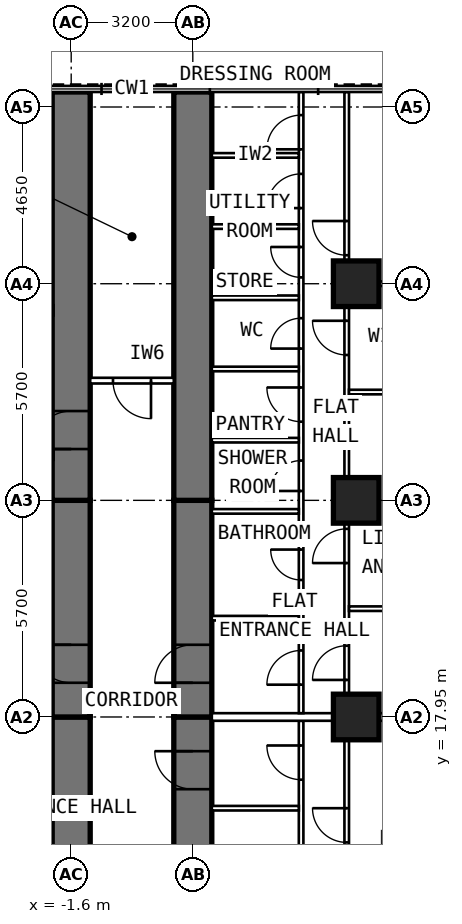
"""IFC4 building model, lengths in metres.
Left out: names, types, materials, properties, quantities, classifications, styles, units other than length and angle.
Written with IfcOpenShell. Run it as: python <this file> out.ifc"""

import sys

from ifc_helpers import new_model, si_unit, direction, frame, frame_2d, origin, origin_2d, place, context, subcontext, project, spatial, rectangle, extrude, element, fill, save


model = new_model("IFC4")
c1 = context("Model", 3, precision=1e-05, world=origin(), true_north=direction((0.0, 1.0)))
c2 = subcontext(c1, "Body", "Model", "MODEL_VIEW")
j1 = project(units=[si_unit("LENGTHUNIT", "METRE"), si_unit("PLANEANGLEUNIT", "RADIAN")], contexts=[c1])
p1 = place(None, origin())
s1 = spatial("IfcSite", under=j1, at=p1, CompositionType="ELEMENT")
p2 = place(p1, origin())
s2 = spatial("IfcBuilding", under=s1, at=p2, CompositionType="ELEMENT")
p3 = place(p2, frame((0.0, 0.0, 109.6)))
s3 = spatial("IfcBuildingStorey", under=s2, at=p3, CompositionType="ELEMENT", Elevation=109.6)
for number, where, z_axis, x_axis in (
    (1, (5.9, 17.95, 0.0), (0.0, 0.0, 1.0), (0.0, 1.0, 0.0)),
    (2, (5.9, 23.65, 0.0), (0.0, 0.0, 1.0), (0.0, 1.0, 0.0)),
    (3, (5.9, 29.35, 0.0), (0.0, 0.0, 1.0), (0.0, 1.0, 0.0)),
):
    element("IfcColumn", number, at=place(p3, frame(where, z_axis=z_axis, x_axis=x_axis)), inside=s3, PredefinedType="COLUMN", context=c2, shape_type="SweptSolid", body=[
        extrude(rectangle(XDim=1.2, YDim=1.2, at=origin_2d()), origin(), (0.0, 0.0, 1.0), 3.6),
    ])
p4 = place(p3, frame((-1.6, 9.6, 0.0), z_axis=(0.0, 0.0, 1.0), x_axis=(0.0, 1.0, 0.0)))
e4 = element("IfcWall", 4, at=p4, inside=s3, PredefinedType="SHEAR", context=c2, shape_type="SweptSolid", body=[
    extrude(rectangle(XDim=8.35, YDim=1.0, at=frame_2d((4.175, 0.0))), origin(), (0.0, 0.0, 1.0), 3.6),
])
p5 = place(p4, frame((3.88, 0.0, 0.0)))
e5 = element("IfcOpeningElement", 5, at=p5, cuts=e4, PredefinedType="OPENING", context=c2, shape_type="SweptSolid", body=[
    extrude(rectangle(XDim=1.0, YDim=2.1, at=frame_2d((0.5, 1.05))), frame((0.0, 0.512, 0.0), z_axis=(0.0, -1.0, 0.0), x_axis=(1.0, 0.0, 0.0)), (0.0, 0.0, 1.0), 1.024),
])
p6 = place(p3, frame((-1.6, 17.95, 0.0), z_axis=(0.0, 0.0, 1.0), x_axis=(0.0, 1.0, 0.0)))
e6 = element("IfcWall", 6, at=p6, inside=s3, PredefinedType="SHEAR", context=c2, shape_type="SweptSolid", body=[
    extrude(rectangle(XDim=5.7, YDim=1.0, at=frame_2d((2.85, 0.0))), origin(), (0.0, 0.0, 1.0), 3.6),
])
p7 = place(p6, frame((0.9, 0.0, 0.0)))
e7 = element("IfcOpeningElement", 7, at=p7, cuts=e6, PredefinedType="OPENING", context=c2, shape_type="SweptSolid", body=[
    extrude(rectangle(XDim=1.0, YDim=2.1, at=frame_2d((0.5, 1.05))), frame((0.0, 0.512, 0.0), z_axis=(0.0, -1.0, 0.0), x_axis=(1.0, 0.0, 0.0)), (0.0, 0.0, 1.0), 1.024),
])
p8 = place(p3, frame((-1.6, 23.65, 0.0), z_axis=(0.0, 0.0, 1.0), x_axis=(0.0, 1.0, 0.0)))
e8 = element("IfcWall", 8, at=p8, inside=s3, PredefinedType="SHEAR", context=c2, shape_type="SweptSolid", body=[
    extrude(rectangle(XDim=10.745, YDim=1.0, at=frame_2d((5.373, 0.0))), origin(), (0.0, 0.0, 1.0), 3.6),
])
p9 = place(p8, frame((1.35, 0.0, 0.0)))
e9 = element("IfcOpeningElement", 9, at=p9, cuts=e8, PredefinedType="OPENING", context=c2, shape_type="SweptSolid", body=[
    extrude(rectangle(XDim=1.0, YDim=2.1, at=frame_2d((0.5, 1.05))), frame((0.0, 0.512, 0.0), z_axis=(0.0, -1.0, 0.0), x_axis=(1.0, 0.0, 0.0)), (0.0, 0.0, 1.0), 1.024),
])
p10 = place(p3, frame((1.6, 9.6, 0.0), z_axis=(0.0, 0.0, 1.0), x_axis=(0.0, 1.0, 0.0)))
e10 = element("IfcWall", 10, at=p10, inside=s3, PredefinedType="SHEAR", context=c2, shape_type="SweptSolid", body=[
    extrude(rectangle(XDim=8.35, YDim=1.0, at=frame_2d((4.175, 0.0))), origin(), (0.0, 0.0, 1.0), 3.6),
])
p11 = place(p10, frame((6.45, 0.0, 0.0)))
e11 = element("IfcOpeningElement", 11, at=p11, cuts=e10, PredefinedType="OPENING", context=c2, shape_type="SweptSolid", body=[
    extrude(rectangle(XDim=1.0, YDim=2.1, at=frame_2d((0.5, 1.05))), frame((0.0, 0.512, 0.0), z_axis=(0.0, -1.0, 0.0), x_axis=(1.0, 0.0, 0.0)), (0.0, 0.0, 1.0), 1.024),
])
p12 = place(p3, frame((1.6, 17.95, 0.0), z_axis=(0.0, 0.0, 1.0), x_axis=(0.0, 1.0, 0.0)))
e12 = element("IfcWall", 12, at=p12, inside=s3, PredefinedType="SHEAR", context=c2, shape_type="SweptSolid", body=[
    extrude(rectangle(XDim=5.7, YDim=1.0, at=frame_2d((2.85, 0.0))), origin(), (0.0, 0.0, 1.0), 3.6),
])
p13 = place(p12, frame((0.9, 0.0, 0.0)))
e13 = element("IfcOpeningElement", 13, at=p13, cuts=e12, PredefinedType="OPENING", context=c2, shape_type="SweptSolid", body=[
    extrude(rectangle(XDim=1.0, YDim=2.1, at=frame_2d((0.5, 1.05))), frame((0.0, 0.512, 0.0), z_axis=(0.0, -1.0, 0.0), x_axis=(1.0, 0.0, 0.0)), (0.0, 0.0, 1.0), 1.024),
])
p14 = place(p3, frame((1.6, 23.65, 0.0), z_axis=(0.0, 0.0, 1.0), x_axis=(0.0, 1.0, 0.0)))
e14 = element("IfcWall", 14, at=p14, inside=s3, PredefinedType="SHEAR", context=c2, shape_type="SweptSolid", body=[
    extrude(rectangle(XDim=10.745, YDim=1.0, at=frame_2d((5.373, 0.0))), origin(), (0.0, 0.0, 1.0), 3.6),
])
p15 = place(p3, frame((-2.1, 17.95, 0.0), z_axis=(0.0, 0.0, 1.0), x_axis=(-1.0, 0.0, 0.0)))
e15 = element("IfcWall", 15, at=p15, inside=s3, PredefinedType="PARTITIONING", context=c2, shape_type="SweptSolid", body=[
    extrude(rectangle(XDim=8.6, YDim=0.2, at=frame_2d((4.3, 0.0))), origin(), (0.0, 0.0, 1.0), 3.3),
])
p16 = place(p3, frame((4.45, 10.1, 0.0), z_axis=(0.0, 0.0, 1.0), x_axis=(0.0, 1.0, 0.0)))
e16 = element("IfcWall", 16, at=p16, inside=s3, PredefinedType="PARTITIONING", context=c2, shape_type="SweptSolid", body=[
    extrude(rectangle(XDim=7.75, YDim=0.12, at=frame_2d((3.875, 0.0))), origin(), (0.0, 0.0, 1.0), 3.3),
])
p17 = place(p16, frame((0.56, 0.0, 0.0)))
e17 = element("IfcOpeningElement", 17, at=p17, cuts=e16, PredefinedType="OPENING", context=c2, shape_type="SweptSolid", body=[
    extrude(rectangle(XDim=0.9, YDim=2.1, at=frame_2d((0.45, 1.05))), frame((0.0, 0.072, 0.0), z_axis=(0.0, -1.0, 0.0), x_axis=(1.0, 0.0, 0.0)), (0.0, 0.0, 1.0), 0.144),
])
p18 = place(p16, frame((3.385, 0.0, 0.0)))
e18 = element("IfcOpeningElement", 18, at=p18, cuts=e16, PredefinedType="OPENING", context=c2, shape_type="SweptSolid", body=[
    extrude(rectangle(XDim=0.8, YDim=2.1, at=frame_2d((0.4, 1.05))), frame((0.0, 0.072, 0.0), z_axis=(0.0, -1.0, 0.0), x_axis=(1.0, 0.0, 0.0)), (0.0, 0.0, 1.0), 0.144),
])
p19 = place(p16, frame((6.2, 0.0, 0.0)))
e19 = element("IfcOpeningElement", 19, at=p19, cuts=e16, PredefinedType="OPENING", context=c2, shape_type="SweptSolid", body=[
    extrude(rectangle(XDim=0.9, YDim=2.1, at=frame_2d((0.45, 1.05))), frame((0.0, 0.072, 0.0), z_axis=(0.0, -1.0, 0.0), x_axis=(1.0, 0.0, 0.0)), (0.0, 0.0, 1.0), 0.144),
])
p20 = place(p3, frame((5.65, 9.6, 0.0), z_axis=(0.0, 0.0, 1.0), x_axis=(0.0, 1.0, 0.0)))
e20 = element("IfcWall", 20, at=p20, inside=s3, PredefinedType="PARTITIONING", context=c2, shape_type="SweptSolid", body=[
    extrude(rectangle(XDim=8.1, YDim=0.12, at=frame_2d((4.05, 0.0))), origin(), (0.0, 0.0, 1.0), 3.3),
])
p21 = place(p20, frame((5.05, 0.0, 0.0)))
e21 = element("IfcOpeningElement", 21, at=p21, cuts=e20, PredefinedType="OPENING", context=c2, shape_type="SweptSolid", body=[
    extrude(rectangle(XDim=0.9, YDim=2.1, at=frame_2d((0.45, 1.05))), frame((0.0, 0.072, 0.0), z_axis=(0.0, -1.0, 0.0), x_axis=(1.0, 0.0, 0.0)), (0.0, 0.0, 1.0), 0.144),
])
p22 = place(p3, frame((2.1, 15.55, 0.0), z_axis=(0.0, 0.0, 1.0), x_axis=(1.0, 0.0, 0.0)))
e22 = element("IfcWall", 22, at=p22, inside=s3, PredefinedType="PARTITIONING", context=c2, shape_type="SweptSolid", body=[
    extrude(rectangle(XDim=2.29, YDim=0.12, at=frame_2d((1.145, 0.0))), origin(), (0.0, 0.0, 1.0), 3.3),
])
p23 = place(p3, frame((4.45, 18.05, 0.0), z_axis=(0.0, 0.0, 1.0), x_axis=(0.0, 1.0, 0.0)))
e23 = element("IfcWall", 23, at=p23, inside=s3, PredefinedType="PARTITIONING", context=c2, shape_type="SweptSolid", body=[
    extrude(rectangle(XDim=16.345, YDim=0.12, at=frame_2d((8.172, 0.0))), origin(), (0.0, 0.0, 1.0), 3.3),
])
p24 = place(p23, frame((0.75, 0.0, 0.0)))
e24 = element("IfcOpeningElement", 24, at=p24, cuts=e23, PredefinedType="OPENING", context=c2, shape_type="SweptSolid", body=[
    extrude(rectangle(XDim=0.9, YDim=2.1, at=frame_2d((0.45, 1.05))), frame((0.0, 0.072, 0.0), z_axis=(0.0, -1.0, 0.0), x_axis=(1.0, 0.0, 0.0)), (0.0, 0.0, 1.0), 0.144),
])
p25 = place(p23, frame((3.505, 0.0, 0.0)))
e25 = element("IfcOpeningElement", 25, at=p25, cuts=e23, PredefinedType="OPENING", context=c2, shape_type="SweptSolid", body=[
    extrude(rectangle(XDim=0.8, YDim=2.1, at=frame_2d((0.4, 1.05))), frame((0.0, 0.072, 0.0), z_axis=(0.0, -1.0, 0.0), x_axis=(1.0, 0.0, 0.0)), (0.0, 0.0, 1.0), 0.144),
])
p26 = place(p23, frame((5.847, 0.0, 0.0)))
e26 = element("IfcOpeningElement", 26, at=p26, cuts=e23, PredefinedType="OPENING", context=c2, shape_type="SweptSolid", body=[
    extrude(rectangle(XDim=0.8, YDim=2.1, at=frame_2d((0.4, 1.05))), frame((0.0, 0.072, 0.0), z_axis=(0.0, -1.0, 0.0), x_axis=(1.0, 0.0, 0.0)), (0.0, 0.0, 1.0), 0.144),
])
p27 = place(p23, frame((7.67, 0.0, 0.0)))
e27 = element("IfcOpeningElement", 27, at=p27, cuts=e23, PredefinedType="OPENING", context=c2, shape_type="SweptSolid", body=[
    extrude(rectangle(XDim=0.9, YDim=2.1, at=frame_2d((0.45, 1.05))), frame((0.0, 0.072, 0.0), z_axis=(0.0, -1.0, 0.0), x_axis=(1.0, 0.0, 0.0)), (0.0, 0.0, 1.0), 0.144),
])
p28 = place(p23, frame((9.593, 0.0, 0.0)))
e28 = element("IfcOpeningElement", 28, at=p28, cuts=e23, PredefinedType="OPENING", context=c2, shape_type="SweptSolid", body=[
    extrude(rectangle(XDim=0.8, YDim=2.1, at=frame_2d((0.4, 1.05))), frame((0.0, 0.072, 0.0), z_axis=(0.0, -1.0, 0.0), x_axis=(1.0, 0.0, 0.0)), (0.0, 0.0, 1.0), 0.144),
])
p29 = place(p23, frame((11.467, 0.0, 0.0)))
e29 = element("IfcOpeningElement", 29, at=p29, cuts=e23, PredefinedType="OPENING", context=c2, shape_type="SweptSolid", body=[
    extrude(rectangle(XDim=0.8, YDim=2.1, at=frame_2d((0.4, 1.05))), frame((0.0, 0.072, 0.0), z_axis=(0.0, -1.0, 0.0), x_axis=(1.0, 0.0, 0.0)), (0.0, 0.0, 1.0), 0.144),
])
p30 = place(p23, frame((13.29, 0.0, 0.0)))
e30 = element("IfcOpeningElement", 30, at=p30, cuts=e23, PredefinedType="OPENING", context=c2, shape_type="SweptSolid", body=[
    extrude(rectangle(XDim=0.9, YDim=2.1, at=frame_2d((0.45, 1.05))), frame((0.0, 0.072, 0.0), z_axis=(0.0, -1.0, 0.0), x_axis=(1.0, 0.0, 0.0)), (0.0, 0.0, 1.0), 0.144),
])
p31 = place(p23, frame((14.837, 0.0, 0.0)))
e31 = element("IfcOpeningElement", 31, at=p31, cuts=e23, PredefinedType="OPENING", context=c2, shape_type="SweptSolid", body=[
    extrude(rectangle(XDim=0.9, YDim=2.1, at=frame_2d((0.45, 1.05))), frame((0.0, 0.072, 0.0), z_axis=(0.0, -1.0, 0.0), x_axis=(1.0, 0.0, 0.0)), (0.0, 0.0, 1.0), 0.144),
])
p32 = place(p3, frame((5.65, 18.05, 0.0), z_axis=(0.0, 0.0, 1.0), x_axis=(0.0, 1.0, 0.0)))
e32 = element("IfcWall", 32, at=p32, inside=s3, PredefinedType="PARTITIONING", context=c2, shape_type="SweptSolid", body=[
    extrude(rectangle(XDim=16.345, YDim=0.12, at=frame_2d((8.172, 0.0))), origin(), (0.0, 0.0, 1.0), 3.3),
])
p33 = place(p32, frame((0.875, 0.0, 0.0)))
e33 = element("IfcOpeningElement", 33, at=p33, cuts=e32, PredefinedType="OPENING", context=c2, shape_type="SweptSolid", body=[
    extrude(rectangle(XDim=0.9, YDim=2.1, at=frame_2d((0.45, 1.05))), frame((0.0, 0.072, 0.0), z_axis=(0.0, -1.0, 0.0), x_axis=(1.0, 0.0, 0.0)), (0.0, 0.0, 1.0), 0.144),
])
p34 = place(p32, frame((3.95, 0.0, 0.0)))
e34 = element("IfcOpeningElement", 34, at=p34, cuts=e32, PredefinedType="OPENING", context=c2, shape_type="SweptSolid", body=[
    extrude(rectangle(XDim=0.9, YDim=2.1, at=frame_2d((0.45, 1.05))), frame((0.0, 0.072, 0.0), z_axis=(0.0, -1.0, 0.0), x_axis=(1.0, 0.0, 0.0)), (0.0, 0.0, 1.0), 0.144),
])
p35 = place(p32, frame((9.425, 0.0, 0.0)))
e35 = element("IfcOpeningElement", 35, at=p35, cuts=e32, PredefinedType="OPENING", context=c2, shape_type="SweptSolid", body=[
    extrude(rectangle(XDim=0.9, YDim=2.1, at=frame_2d((0.45, 1.05))), frame((0.0, 0.072, 0.0), z_axis=(0.0, -1.0, 0.0), x_axis=(1.0, 0.0, 0.0)), (0.0, 0.0, 1.0), 0.144),
])
p36 = place(p32, frame((12.05, 0.0, 0.0)))
e36 = element("IfcOpeningElement", 36, at=p36, cuts=e32, PredefinedType="OPENING", context=c2, shape_type="SweptSolid", body=[
    extrude(rectangle(XDim=0.9, YDim=2.1, at=frame_2d((0.45, 1.05))), frame((0.0, 0.072, 0.0), z_axis=(0.0, -1.0, 0.0), x_axis=(1.0, 0.0, 0.0)), (0.0, 0.0, 1.0), 0.144),
])
for number, where, z_axis, x_axis in (
    (37, (5.71, 20.8, 0.0), (0.0, 0.0, 1.0), (1.0, 0.0, 0.0)),
    (38, (5.71, 26.5, 0.0), (0.0, 0.0, 1.0), (1.0, 0.0, 0.0)),
):
    element("IfcWall", number, at=place(p3, frame(where, z_axis=z_axis, x_axis=x_axis)), inside=s3, PredefinedType="PARTITIONING", context=c2, shape_type="SweptSolid", body=[
        extrude(rectangle(XDim=4.99, YDim=0.12, at=frame_2d((2.495, 0.0))), origin(), (0.0, 0.0, 1.0), 3.3),
    ])
p37 = place(p3, frame((5.71, 29.35, 0.0), z_axis=(0.0, 0.0, 1.0), x_axis=(1.0, 0.0, 0.0)))
e39 = element("IfcWall", 39, at=p37, inside=s3, PredefinedType="PARTITIONING", context=c2, shape_type="SweptSolid", body=[
    extrude(rectangle(XDim=4.99, YDim=0.12, at=frame_2d((2.495, 0.0))), origin(), (0.0, 0.0, 1.0), 2.3),
])
for number, where, z_axis, x_axis in (
    (40, (2.1, 20.55, 0.0), (0.0, 0.0, 1.0), (1.0, 0.0, 0.0)),
    (41, (2.1, 23.36, 0.0), (0.0, 0.0, 1.0), (1.0, 0.0, 0.0)),
    (42, (2.1, 25.233, 0.0), (0.0, 0.0, 1.0), (1.0, 0.0, 0.0)),
    (43, (2.1, 27.107, 0.0), (0.0, 0.0, 1.0), (1.0, 0.0, 0.0)),
):
    element("IfcWall", number, at=place(p3, frame(where, z_axis=z_axis, x_axis=x_axis)), inside=s3, PredefinedType="PARTITIONING", context=c2, shape_type="SweptSolid", body=[
        extrude(rectangle(XDim=2.29, YDim=0.12, at=frame_2d((1.145, 0.0))), origin(), (0.0, 0.0, 1.0), 3.3),
    ])
p38 = place(p3, frame((2.1, 28.98, 0.0), z_axis=(0.0, 0.0, 1.0), x_axis=(1.0, 0.0, 0.0)))
e44 = element("IfcWall", 44, at=p38, inside=s3, PredefinedType="PARTITIONING", context=c2, shape_type="SweptSolid", body=[
    extrude(rectangle(XDim=2.29, YDim=0.12, at=frame_2d((1.145, 0.0))), origin(), (0.0, 0.0, 1.0), 2.3),
])
for number, where, z_axis, x_axis in (
    (45, (2.1, 30.853, 0.0), (0.0, 0.0, 1.0), (1.0, 0.0, 0.0)),
    (46, (2.1, 32.727, 0.0), (0.0, 0.0, 1.0), (1.0, 0.0, 0.0)),
):
    element("IfcWall", number, at=place(p3, frame(where, z_axis=z_axis, x_axis=x_axis)), inside=s3, PredefinedType="PARTITIONING", context=c2, shape_type="SweptSolid", body=[
        extrude(rectangle(XDim=2.29, YDim=0.12, at=frame_2d((1.145, 0.0))), origin(), (0.0, 0.0, 1.0), 3.3),
    ])
p39 = place(p3, frame((2.1, 17.95, 0.0), z_axis=(0.0, 0.0, 1.0), x_axis=(1.0, 0.0, 0.0)))
e47 = element("IfcWall", 47, at=p39, inside=s3, PredefinedType="PARTITIONING", context=c2, shape_type="SweptSolid", body=[
    extrude(rectangle(XDim=8.6, YDim=0.2, at=frame_2d((4.3, 0.0))), origin(), (0.0, 0.0, 1.0), 3.3),
])
p40 = place(p3, frame((1.1, 26.8, 0.0), z_axis=(0.0, 0.0, 1.0), x_axis=(-1.0, 0.0, 0.0)))
e48 = element("IfcWall", 48, at=p40, inside=s3, PredefinedType="PARTITIONING", context=c2, shape_type="SweptSolid", body=[
    extrude(rectangle(XDim=2.2, YDim=0.15, at=frame_2d((1.1, 0.0))), origin(), (0.0, 0.0, 1.0), 3.3),
])
p41 = place(p40, frame((0.6, 0.0, 0.0)))
e49 = element("IfcOpeningElement", 49, at=p41, cuts=e48, PredefinedType="OPENING", context=c2, shape_type="SweptSolid", body=[
    extrude(rectangle(XDim=1.0, YDim=2.1, at=frame_2d((0.5, 1.05))), frame((0.0, 0.087, 0.0), z_axis=(0.0, -1.0, 0.0), x_axis=(1.0, 0.0, 0.0)), (0.0, 0.0, 1.0), 0.174),
])
p42 = place(p7, origin())
e50 = element("IfcDoor", 50, at=p42, inside=s3, OperationType="SINGLE_SWING_RIGHT", PredefinedType="DOOR", context=c2, shape_type="SweptSolid", body=[
    extrude(rectangle(XDim=1.0, YDim=2.1, at=frame_2d((0.5, 1.05))), frame((0.0, 0.25, 0.0), z_axis=(0.0, -1.0, 0.0), x_axis=(1.0, 0.0, 0.0)), (0.0, 0.0, 1.0), 0.5),
])
fill(e7, e50)
p43 = place(p11, origin())
e51 = element("IfcDoor", 51, at=p43, inside=s3, OperationType="SINGLE_SWING_RIGHT", PredefinedType="DOOR", context=c2, shape_type="SweptSolid", body=[
    extrude(rectangle(XDim=1.0, YDim=2.1, at=frame_2d((0.5, 1.05))), frame((0.0, 0.25, 0.0), z_axis=(0.0, -1.0, 0.0), x_axis=(1.0, 0.0, 0.0)), (0.0, 0.0, 1.0), 0.5),
])
fill(e11, e51)
p44 = place(p21, origin())
e52 = element("IfcDoor", 52, at=p44, inside=s3, OperationType="SINGLE_SWING_RIGHT", PredefinedType="DOOR", context=c2, shape_type="SweptSolid", body=[
    extrude(rectangle(XDim=0.9, YDim=2.1, at=frame_2d((0.45, 1.05))), frame((0.0, 0.025, 0.0), z_axis=(0.0, -1.0, 0.0), x_axis=(1.0, 0.0, 0.0)), (0.0, 0.0, 1.0), 0.05),
])
fill(e21, e52)
p45 = place(p19, origin())
e53 = element("IfcDoor", 53, at=p45, inside=s3, OperationType="SINGLE_SWING_RIGHT", PredefinedType="DOOR", context=c2, shape_type="SweptSolid", body=[
    extrude(rectangle(XDim=0.9, YDim=2.1, at=frame_2d((0.45, 1.05))), frame((0.0, 0.025, 0.0), z_axis=(0.0, -1.0, 0.0), x_axis=(1.0, 0.0, 0.0)), (0.0, 0.0, 1.0), 0.05),
])
fill(e19, e53)
p46 = place(p13, origin())
e54 = element("IfcDoor", 54, at=p46, inside=s3, OperationType="SINGLE_SWING_LEFT", PredefinedType="DOOR", context=c2, shape_type="SweptSolid", body=[
    extrude(rectangle(XDim=1.0, YDim=2.1, at=frame_2d((0.5, 1.05))), frame((0.0, 0.25, 0.0), z_axis=(0.0, -1.0, 0.0), x_axis=(1.0, 0.0, 0.0)), (0.0, 0.0, 1.0), 0.5),
])
fill(e13, e54)
p47 = place(p33, origin())
e55 = element("IfcDoor", 55, at=p47, inside=s3, OperationType="SINGLE_SWING_LEFT", PredefinedType="DOOR", context=c2, shape_type="SweptSolid", body=[
    extrude(rectangle(XDim=0.9, YDim=2.1, at=frame_2d((0.45, 1.05))), frame((0.0, 0.025, 0.0), z_axis=(0.0, -1.0, 0.0), x_axis=(1.0, 0.0, 0.0)), (0.0, 0.0, 1.0), 0.05),
])
fill(e33, e55)
p48 = place(p34, origin())
e56 = element("IfcDoor", 56, at=p48, inside=s3, OperationType="SINGLE_SWING_LEFT", PredefinedType="DOOR", context=c2, shape_type="SweptSolid", body=[
    extrude(rectangle(XDim=0.9, YDim=2.1, at=frame_2d((0.45, 1.05))), frame((0.0, 0.025, 0.0), z_axis=(0.0, -1.0, 0.0), x_axis=(1.0, 0.0, 0.0)), (0.0, 0.0, 1.0), 0.05),
])
fill(e34, e56)
p49 = place(p35, origin())
e57 = element("IfcDoor", 57, at=p49, inside=s3, OperationType="SINGLE_SWING_RIGHT", PredefinedType="DOOR", context=c2, shape_type="SweptSolid", body=[
    extrude(rectangle(XDim=0.9, YDim=2.1, at=frame_2d((0.45, 1.05))), frame((0.0, 0.025, 0.0), z_axis=(0.0, -1.0, 0.0), x_axis=(1.0, 0.0, 0.0)), (0.0, 0.0, 1.0), 0.05),
])
fill(e35, e57)
p50 = place(p36, origin())
e58 = element("IfcDoor", 58, at=p50, inside=s3, OperationType="SINGLE_SWING_RIGHT", PredefinedType="DOOR", context=c2, shape_type="SweptSolid", body=[
    extrude(rectangle(XDim=0.9, YDim=2.1, at=frame_2d((0.45, 1.05))), frame((0.0, 0.025, 0.0), z_axis=(0.0, -1.0, 0.0), x_axis=(1.0, 0.0, 0.0)), (0.0, 0.0, 1.0), 0.05),
])
fill(e36, e58)
p51 = place(p24, origin())
e59 = element("IfcDoor", 59, at=p51, inside=s3, OperationType="SINGLE_SWING_LEFT", PredefinedType="DOOR", context=c2, shape_type="SweptSolid", body=[
    extrude(rectangle(XDim=0.9, YDim=2.1, at=frame_2d((0.45, 1.05))), frame((0.0, 0.025, 0.0), z_axis=(0.0, -1.0, 0.0), x_axis=(1.0, 0.0, 0.0)), (0.0, 0.0, 1.0), 0.05),
])
fill(e24, e59)
p52 = place(p25, origin())
e60 = element("IfcDoor", 60, at=p52, inside=s3, OperationType="SINGLE_SWING_RIGHT", PredefinedType="DOOR", context=c2, shape_type="SweptSolid", body=[
    extrude(rectangle(XDim=0.8, YDim=2.1, at=frame_2d((0.4, 1.05))), frame((0.0, 0.025, 0.0), z_axis=(0.0, -1.0, 0.0), x_axis=(1.0, 0.0, 0.0)), (0.0, 0.0, 1.0), 0.05),
])
fill(e25, e60)
p53 = place(p26, origin())
e61 = element("IfcDoor", 61, at=p53, inside=s3, OperationType="SINGLE_SWING_LEFT", PredefinedType="DOOR", context=c2, shape_type="SweptSolid", body=[
    extrude(rectangle(XDim=0.8, YDim=2.1, at=frame_2d((0.4, 1.05))), frame((0.0, 0.025, 0.0), z_axis=(0.0, -1.0, 0.0), x_axis=(1.0, 0.0, 0.0)), (0.0, 0.0, 1.0), 0.05),
])
fill(e26, e61)
p54 = place(p27, origin())
e62 = element("IfcDoor", 62, at=p54, inside=s3, OperationType="SINGLE_SWING_RIGHT", PredefinedType="DOOR", context=c2, shape_type="SweptSolid", body=[
    extrude(rectangle(XDim=0.9, YDim=2.1, at=frame_2d((0.45, 1.05))), frame((0.0, 0.025, 0.0), z_axis=(0.0, -1.0, 0.0), x_axis=(1.0, 0.0, 0.0)), (0.0, 0.0, 1.0), 0.05),
])
fill(e27, e62)
p55 = place(p28, origin())
e63 = element("IfcDoor", 63, at=p55, inside=s3, OperationType="SINGLE_SWING_LEFT", PredefinedType="DOOR", context=c2, shape_type="SweptSolid", body=[
    extrude(rectangle(XDim=0.8, YDim=2.1, at=frame_2d((0.4, 1.05))), frame((0.0, 0.025, 0.0), z_axis=(0.0, -1.0, 0.0), x_axis=(1.0, 0.0, 0.0)), (0.0, 0.0, 1.0), 0.05),
])
fill(e28, e63)
p56 = place(p29, origin())
e64 = element("IfcDoor", 64, at=p56, inside=s3, OperationType="SINGLE_SWING_RIGHT", PredefinedType="DOOR", context=c2, shape_type="SweptSolid", body=[
    extrude(rectangle(XDim=0.8, YDim=2.1, at=frame_2d((0.4, 1.05))), frame((0.0, 0.025, 0.0), z_axis=(0.0, -1.0, 0.0), x_axis=(1.0, 0.0, 0.0)), (0.0, 0.0, 1.0), 0.05),
])
fill(e29, e64)
p57 = place(p30, origin())
e65 = element("IfcDoor", 65, at=p57, inside=s3, OperationType="SINGLE_SWING_LEFT", PredefinedType="DOOR", context=c2, shape_type="SweptSolid", body=[
    extrude(rectangle(XDim=0.9, YDim=2.1, at=frame_2d((0.45, 1.05))), frame((0.0, 0.025, 0.0), z_axis=(0.0, -1.0, 0.0), x_axis=(1.0, 0.0, 0.0)), (0.0, 0.0, 1.0), 0.05),
])
fill(e30, e65)
p58 = place(p31, origin())
e66 = element("IfcDoor", 66, at=p58, inside=s3, OperationType="SINGLE_SWING_LEFT", PredefinedType="DOOR", context=c2, shape_type="SweptSolid", body=[
    extrude(rectangle(XDim=0.9, YDim=2.1, at=frame_2d((0.45, 1.05))), frame((0.0, 0.025, 0.0), z_axis=(0.0, -1.0, 0.0), x_axis=(1.0, 0.0, 0.0)), (0.0, 0.0, 1.0), 0.05),
])
fill(e31, e66)
p59 = place(p41, origin())
e67 = element("IfcDoor", 67, at=p59, inside=s3, OperationType="SINGLE_SWING_LEFT", PredefinedType="DOOR", context=c2, shape_type="SweptSolid", body=[
    extrude(rectangle(XDim=1.0, YDim=2.1, at=frame_2d((0.5, 1.05))), frame((0.0, 0.025, 0.0), z_axis=(0.0, -1.0, 0.0), x_axis=(1.0, 0.0, 0.0)), (0.0, 0.0, 1.0), 0.05),
])
fill(e49, e67)
p60 = place(p9, origin())
e68 = element("IfcDoor", 68, at=p60, inside=s3, OperationType="SINGLE_SWING_LEFT", PredefinedType="DOOR", context=c2, shape_type="SweptSolid", body=[
    extrude(rectangle(XDim=1.0, YDim=2.1, at=frame_2d((0.5, 1.05))), frame((0.0, 0.25, 0.0), z_axis=(0.0, -1.0, 0.0), x_axis=(1.0, 0.0, 0.0)), (0.0, 0.0, 1.0), 0.5),
])
fill(e9, e68)
save(model, sys.argv[1])
